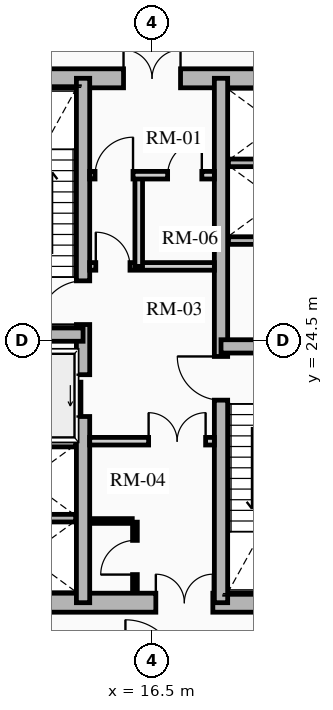
"""IFC4 building model, lengths in metres.
Left out: names, types, materials, properties, quantities, classifications, styles, units other than length and angle.
Written with IfcOpenShell. Run it as: python <this file> out.ifc"""

import sys

from ifc_helpers import new_model, si_unit, direction, frame, frame_2d, origin, place, context, subcontext, project, spatial, rectangle, extrude, source, transform, mapped, element, fill, save


model = new_model("IFC4")
c1 = context("Model", 3, precision=1e-05, world=origin(), true_north=direction((0.0, 1.0)))
c2 = subcontext(c1, "Body", "Model", "MODEL_VIEW")
j1 = project(units=[si_unit("LENGTHUNIT", "METRE"), si_unit("PLANEANGLEUNIT", "RADIAN")], contexts=[c1])
p1 = place(None, origin())
s1 = spatial("IfcSite", under=j1, at=p1, CompositionType="ELEMENT")
p2 = place(p1, origin())
s2 = spatial("IfcBuilding", under=s1, at=p2, CompositionType="ELEMENT")
p3 = place(p2, frame((0.0, 0.0, 65.65)))
s3 = spatial("IfcBuildingStorey", under=s2, at=p3, CompositionType="ELEMENT", Elevation=65.65)
p4 = place(p3, frame((11.15, 17.6, 0.0), z_axis=(0.0, 0.0, 1.0), x_axis=(1.0, 0.0, 0.0)))
e1 = element("IfcWall", 1, at=p4, inside=s3, PredefinedType="SHEAR", context=c2, shape_type="SweptSolid", body=[
    extrude(rectangle(XDim=10.7, YDim=0.5, at=frame_2d((5.35, 0.0))), origin(), (0.0, 0.0, 1.0), 4.5),
])
m1 = source(origin(), c2, "Body", "SweptSolid", [
    extrude(rectangle(XDim=1.5, YDim=2.02, at=frame_2d((0.75, 1.01))), frame((0.0, 0.26, 0.0), z_axis=(0.0, -1.0, 0.0), x_axis=(1.0, 0.0, 0.0)), (0.0, 0.0, 1.0), 0.52),
])
p5 = place(p4, frame((5.45, 0.0, 0.0)))
e2 = element("IfcOpeningElement", 2, at=p5, cuts=e1, PredefinedType="OPENING", context=c2, shape_type="MappedRepresentation", body=[
    mapped(m1, transform((0.0, 0.0, 0.0), x_axis=(1.0, 0.0, 0.0), y_axis=(0.0, 1.0, 0.0), z_axis=(0.0, 0.0, 1.0), scale=1.0)),
])
p6 = place(p3, frame((11.15, 31.4, 0.0), z_axis=(0.0, 0.0, 1.0), x_axis=(1.0, 0.0, 0.0)))
e3 = element("IfcWall", 3, at=p6, inside=s3, PredefinedType="SHEAR", context=c2, shape_type="SweptSolid", body=[
    extrude(rectangle(XDim=10.7, YDim=0.5, at=frame_2d((5.35, 0.0))), origin(), (0.0, 0.0, 1.0), 4.5),
])
p7 = place(p6, frame((4.6, 0.0, 0.0)))
e4 = element("IfcOpeningElement", 4, at=p7, cuts=e3, PredefinedType="OPENING", context=c2, shape_type="MappedRepresentation", body=[
    mapped(m1, transform((0.0, 0.0, 0.0), x_axis=(1.0, 0.0, 0.0), y_axis=(0.0, 1.0, 0.0), z_axis=(0.0, 0.0, 1.0), scale=1.0)),
])
p8 = place(p3, frame((14.685, 17.6, 0.0), z_axis=(0.0, 0.0, 1.0), x_axis=(0.0, 1.0, 0.0)))
e5 = element("IfcWall", 5, at=p8, inside=s3, PredefinedType="SHEAR", context=c2, shape_type="SweptSolid", body=[
    extrude(rectangle(XDim=13.8, YDim=0.35, at=frame_2d((6.9, 0.0))), origin(), (0.0, 0.0, 1.0), 4.5),
])
m2 = source(origin(), c2, "Body", "SweptSolid", [
    extrude(rectangle(XDim=1.1, YDim=2.015, at=frame_2d((0.55, 1.007))), frame((0.0, 0.185, 0.0), z_axis=(0.0, -1.0, 0.0), x_axis=(1.0, 0.0, 0.0)), (0.0, 0.0, 1.0), 0.37),
])
p9 = place(p8, frame((4.9, 0.0, 0.0)))
e6 = element("IfcOpeningElement", 6, at=p9, cuts=e5, PredefinedType="OPENING", context=c2, shape_type="MappedRepresentation", body=[
    mapped(m2, transform((0.0, 0.0, 0.0), x_axis=(1.0, 0.0, 0.0), y_axis=(0.0, 1.0, 0.0), z_axis=(0.0, 0.0, 1.0), scale=1.0)),
])
m3 = source(origin(), c2, "Body", "SweptSolid", [
    extrude(rectangle(XDim=1.15, YDim=2.02, at=frame_2d((0.575, 1.01))), frame((0.0, 0.185, 0.0), z_axis=(0.0, -1.0, 0.0), x_axis=(1.0, 0.0, 0.0)), (0.0, 0.0, 1.0), 0.37),
])
p10 = place(p8, frame((7.32, 0.0, 0.0)))
e7 = element("IfcOpeningElement", 7, at=p10, cuts=e5, PredefinedType="OPENING", context=c2, shape_type="MappedRepresentation", body=[
    mapped(m3, transform((0.0, 0.0, 0.0), x_axis=(1.0, 0.0, 0.0), y_axis=(0.0, 1.0, 0.0), z_axis=(0.0, 0.0, 1.0), scale=1.0)),
])
p11 = place(p3, frame((18.315, 17.6, 0.0), z_axis=(0.0, 0.0, 1.0), x_axis=(0.0, 1.0, 0.0)))
e8 = element("IfcWall", 8, at=p11, inside=s3, PredefinedType="SHEAR", context=c2, shape_type="SweptSolid", body=[
    extrude(rectangle(XDim=13.8, YDim=0.35, at=frame_2d((6.9, 0.0))), origin(), (0.0, 0.0, 1.0), 4.5),
])
p12 = place(p11, frame((5.33, 0.0, 0.0)))
e9 = element("IfcOpeningElement", 9, at=p12, cuts=e8, PredefinedType="OPENING", context=c2, shape_type="MappedRepresentation", body=[
    mapped(m3, transform((0.0, 0.0, 0.0), x_axis=(1.0, 0.0, 0.0), y_axis=(0.0, 1.0, 0.0), z_axis=(0.0, 0.0, 1.0), scale=1.0)),
])
for number, where, z_axis, x_axis in (
    (10, (11.4, 24.655, 0.0), (0.0, 0.0, 1.0), (1.0, 0.0, 0.0)),
    (11, (18.315, 24.345, 0.0), (0.0, 0.0, 1.0), (1.0, 0.0, 0.0)),
):
    element("IfcWall", number, at=place(p3, frame(where, z_axis=z_axis, x_axis=x_axis)), inside=s3, PredefinedType="SHEAR", context=c2, shape_type="SweptSolid", body=[
        extrude(rectangle(XDim=3.285, YDim=0.35, at=frame_2d((1.643, 0.0))), origin(), (0.0, 0.0, 1.0), 4.5),
    ])
for number, where, z_axis, x_axis in (
    (12, (11.52, 21.8, 0.0), (0.0, 0.0, 1.0), (1.0, 0.0, 0.0)),
    (13, (11.52, 19.825, 0.0), (0.0, 0.0, 1.0), (1.0, 0.0, 0.0)),
    (14, (18.51, 27.13, 0.0), (0.0, 0.0, 1.0), (1.0, 0.0, 0.0)),
    (15, (18.51, 29.175, 0.0), (0.0, 0.0, 1.0), (1.0, 0.0, 0.0)),
):
    element("IfcWall", number, at=place(p3, frame(where, z_axis=z_axis, x_axis=x_axis)), inside=s3, PredefinedType="SHEAR", context=c2, shape_type="SweptSolid", body=[
        extrude(rectangle(XDim=2.97, YDim=0.2, at=frame_2d((1.485, 0.0))), origin(), (0.0, 0.0, 1.0), 4.5),
    ])
p13 = place(p3, frame((14.86, 21.85, 0.0), z_axis=(0.0, 0.0, 1.0), x_axis=(1.0, 0.0, 0.0)))
e16 = element("IfcWall", 16, at=p13, inside=s3, PredefinedType="PARTITIONING", context=c2, shape_type="SweptSolid", body=[
    extrude(rectangle(XDim=3.28, YDim=0.2, at=frame_2d((1.64, 0.0))), origin(), (0.0, 0.0, 1.0), 4.245),
])
m4 = source(origin(), c2, "Body", "SweptSolid", [
    extrude(rectangle(XDim=1.5, YDim=2.02, at=frame_2d((0.75, 1.01))), frame((0.0, 0.11, 0.0), z_axis=(0.0, -1.0, 0.0), x_axis=(1.0, 0.0, 0.0)), (0.0, 0.0, 1.0), 0.22),
])
p14 = place(p13, frame((1.55, 0.0, 0.0)))
e17 = element("IfcOpeningElement", 17, at=p14, cuts=e16, PredefinedType="OPENING", context=c2, shape_type="MappedRepresentation", body=[
    mapped(m4, transform((0.0, 0.0, 0.0), x_axis=(1.0, 0.0, 0.0), y_axis=(0.0, 1.0, 0.0), z_axis=(0.0, 0.0, 1.0), scale=1.0)),
])
p15 = place(p3, frame((14.86, 26.45, 0.0), z_axis=(0.0, 0.0, 1.0), x_axis=(1.0, 0.0, 0.0)))
e18 = element("IfcWall", 18, at=p15, inside=s3, PredefinedType="PARTITIONING", context=c2, shape_type="SweptSolid", body=[
    extrude(rectangle(XDim=3.28, YDim=0.2, at=frame_2d((1.64, 0.0))), origin(), (0.0, 0.0, 1.0), 4.245),
])
m5 = source(origin(), c2, "Body", "SweptSolid", [
    extrude(rectangle(XDim=0.9, YDim=2.005, at=frame_2d((0.45, 1.002))), frame((0.0, 0.11, 0.0), z_axis=(0.0, -1.0, 0.0), x_axis=(1.0, 0.0, 0.0)), (0.0, 0.0, 1.0), 0.22),
])
p16 = place(p15, frame((0.16, 0.0, 0.0)))
e19 = element("IfcOpeningElement", 19, at=p16, cuts=e18, PredefinedType="OPENING", context=c2, shape_type="MappedRepresentation", body=[
    mapped(m5, transform((0.0, 0.0, 0.0), x_axis=(1.0, 0.0, 0.0), y_axis=(0.0, 1.0, 0.0), z_axis=(0.0, 0.0, 1.0), scale=1.0)),
])
p17 = place(p3, frame((16.15, 26.45, 0.0), z_axis=(0.0, 0.0, 1.0), x_axis=(0.0, 1.0, 0.0)))
e20 = element("IfcWall", 20, at=p17, inside=s3, PredefinedType="PARTITIONING", context=c2, shape_type="SweptSolid", body=[
    extrude(rectangle(XDim=2.4, YDim=0.2, at=frame_2d((1.2, 0.0))), origin(), (0.0, 0.0, 1.0), 4.245),
])
p18 = place(p3, frame((14.86, 28.85, 0.0), z_axis=(0.0, 0.0, 1.0), x_axis=(1.0, 0.0, 0.0)))
e21 = element("IfcWall", 21, at=p18, inside=s3, PredefinedType="PARTITIONING", context=c2, shape_type="SweptSolid", body=[
    extrude(rectangle(XDim=3.28, YDim=0.2, at=frame_2d((1.64, 0.0))), origin(), (0.0, 0.0, 1.0), 4.245),
])
m6 = source(origin(), c2, "Body", "SweptSolid", [
    extrude(rectangle(XDim=1.0, YDim=2.015, at=frame_2d((0.5, 1.007))), frame((0.0, 0.11, 0.0), z_axis=(0.0, -1.0, 0.0), x_axis=(1.0, 0.0, 0.0)), (0.0, 0.0, 1.0), 0.22),
])
p19 = place(p18, frame((0.14, 0.0, 0.0)))
e22 = element("IfcOpeningElement", 22, at=p19, cuts=e21, PredefinedType="OPENING", context=c2, shape_type="MappedRepresentation", body=[
    mapped(m6, transform((0.0, 0.0, 0.0), x_axis=(1.0, 0.0, 0.0), y_axis=(0.0, 1.0, 0.0), z_axis=(0.0, 0.0, 1.0), scale=1.0)),
])
p20 = place(p18, frame((2.05, 0.0, 0.0)))
e23 = element("IfcOpeningElement", 23, at=p20, cuts=e21, PredefinedType="OPENING", context=c2, shape_type="MappedRepresentation", body=[
    mapped(m5, transform((0.0, 0.0, 0.0), x_axis=(1.0, 0.0, 0.0), y_axis=(0.0, 1.0, 0.0), z_axis=(0.0, 0.0, 1.0), scale=1.0)),
])
p21 = place(p3, frame((16.05, 17.92, 0.0), z_axis=(0.0, 0.0, 1.0), x_axis=(0.0, 1.0, 0.0)))
e24 = element("IfcWall", 24, at=p21, inside=s3, PredefinedType="PARTITIONING", context=c2, shape_type="SweptSolid", body=[
    extrude(rectangle(XDim=1.8, YDim=0.125, at=frame_2d((0.9, 0.0))), origin(), (0.0, 0.0, 1.0), 4.245),
])
m7 = source(origin(), c2, "Body", "SweptSolid", [
    extrude(rectangle(XDim=0.9, YDim=2.005, at=frame_2d((0.45, 1.002))), frame((0.0, 0.073, 0.0), z_axis=(0.0, -1.0, 0.0), x_axis=(1.0, 0.0, 0.0)), (0.0, 0.0, 1.0), 0.145),
])
p22 = place(p21, frame((0.42, 0.0, 0.0)))
e25 = element("IfcOpeningElement", 25, at=p22, cuts=e24, PredefinedType="OPENING", context=c2, shape_type="MappedRepresentation", body=[
    mapped(m7, transform((0.0, 0.0, 0.0), x_axis=(1.0, 0.0, 0.0), y_axis=(0.0, 1.0, 0.0), z_axis=(0.0, 0.0, 1.0), scale=1.0)),
])
p23 = place(p3, frame((14.88, 19.75, 0.0), z_axis=(0.0, 0.0, 1.0), x_axis=(1.0, 0.0, 0.0)))
e26 = element("IfcWall", 26, at=p23, inside=s3, PredefinedType="PARTITIONING", context=c2, shape_type="SweptSolid", body=[
    extrude(rectangle(XDim=1.1, YDim=0.125, at=frame_2d((0.55, 0.0))), origin(), (0.0, 0.0, 1.0), 4.245),
])
m8 = source(origin(), c2, "Body", "SweptSolid", [
    extrude(rectangle(XDim=1.1, YDim=2.015, at=frame_2d((0.55, 1.007))), frame((0.0, 0.025, 0.0), z_axis=(0.0, -1.0, 0.0), x_axis=(1.0, 0.0, 0.0)), (0.0, 0.0, 1.0), 0.05),
])
p24 = place(p9, origin())
e27 = element("IfcDoor", 27, at=p24, inside=s3, OperationType="SLIDING_TO_LEFT", PredefinedType="DOOR", context=c2, shape_type="MappedRepresentation", body=[
    mapped(m8, transform((0.0, 0.0, 0.0), x_axis=(1.0, 0.0, 0.0), y_axis=(0.0, 1.0, 0.0), z_axis=(0.0, 0.0, 1.0), scale=1.0)),
])
fill(e6, e27)
m9 = source(origin(), c2, "Body", "SweptSolid", [
    extrude(rectangle(XDim=1.15, YDim=2.02, at=frame_2d((0.575, 1.01))), frame((0.0, 0.025, 0.0), z_axis=(0.0, -1.0, 0.0), x_axis=(1.0, 0.0, 0.0)), (0.0, 0.0, 1.0), 0.05),
])
p25 = place(p10, origin())
e28 = element("IfcDoor", 28, at=p25, inside=s3, OperationType="SINGLE_SWING_LEFT", PredefinedType="DOOR", context=c2, shape_type="MappedRepresentation", body=[
    mapped(m9, transform((0.0, 0.0, 0.0), x_axis=(1.0, 0.0, 0.0), y_axis=(0.0, 1.0, 0.0), z_axis=(0.0, 0.0, 1.0), scale=1.0)),
])
fill(e7, e28)
p26 = place(p12, origin())
e29 = element("IfcDoor", 29, at=p26, inside=s3, OperationType="SINGLE_SWING_RIGHT", PredefinedType="DOOR", context=c2, shape_type="MappedRepresentation", body=[
    mapped(m9, transform((0.0, 0.0, 0.0), x_axis=(1.0, 0.0, 0.0), y_axis=(0.0, 1.0, 0.0), z_axis=(0.0, 0.0, 1.0), scale=1.0)),
])
fill(e9, e29)
m10 = source(origin(), c2, "Body", "SweptSolid", [
    extrude(rectangle(XDim=1.5, YDim=2.02, at=frame_2d((0.75, 1.01))), frame((0.0, 0.025, 0.0), z_axis=(0.0, -1.0, 0.0), x_axis=(1.0, 0.0, 0.0)), (0.0, 0.0, 1.0), 0.05),
])
p27 = place(p7, origin())
e30 = element("IfcDoor", 30, at=p27, inside=s3, OperationType="DOUBLE_DOOR_SINGLE_SWING", PredefinedType="DOOR", context=c2, shape_type="MappedRepresentation", body=[
    mapped(m10, transform((0.0, 0.0, 0.0), x_axis=(1.0, 0.0, 0.0), y_axis=(0.0, 1.0, 0.0), z_axis=(0.0, 0.0, 1.0), scale=1.0)),
])
fill(e4, e30)
p28 = place(p5, origin())
e31 = element("IfcDoor", 31, at=p28, inside=s3, OperationType="DOUBLE_DOOR_SINGLE_SWING", PredefinedType="DOOR", context=c2, shape_type="MappedRepresentation", body=[
    mapped(m10, transform((0.0, 0.0, 0.0), x_axis=(1.0, 0.0, 0.0), y_axis=(0.0, 1.0, 0.0), z_axis=(0.0, 0.0, 1.0), scale=1.0)),
])
fill(e2, e31)
p29 = place(p14, origin())
e32 = element("IfcDoor", 32, at=p29, inside=s3, OperationType="DOUBLE_DOOR_SINGLE_SWING", PredefinedType="DOOR", context=c2, shape_type="MappedRepresentation", body=[
    mapped(m10, transform((0.0, 0.0, 0.0), x_axis=(1.0, 0.0, 0.0), y_axis=(0.0, 1.0, 0.0), z_axis=(0.0, 0.0, 1.0), scale=1.0)),
])
fill(e17, e32)
m11 = source(origin(), c2, "Body", "SweptSolid", [
    extrude(rectangle(XDim=0.9, YDim=2.005, at=frame_2d((0.45, 1.002))), frame((0.0, 0.025, 0.0), z_axis=(0.0, -1.0, 0.0), x_axis=(1.0, 0.0, 0.0)), (0.0, 0.0, 1.0), 0.05),
])
p30 = place(p16, origin())
e33 = element("IfcDoor", 33, at=p30, inside=s3, OperationType="SINGLE_SWING_LEFT", PredefinedType="DOOR", context=c2, shape_type="MappedRepresentation", body=[
    mapped(m11, transform((0.0, 0.0, 0.0), x_axis=(1.0, 0.0, 0.0), y_axis=(0.0, 1.0, 0.0), z_axis=(0.0, 0.0, 1.0), scale=1.0)),
])
fill(e19, e33)
m12 = source(origin(), c2, "Body", "SweptSolid", [
    extrude(rectangle(XDim=1.0, YDim=2.015, at=frame_2d((0.5, 1.007))), frame((0.0, 0.025, 0.0), z_axis=(0.0, -1.0, 0.0), x_axis=(1.0, 0.0, 0.0)), (0.0, 0.0, 1.0), 0.05),
])
p31 = place(p19, origin())
e34 = element("IfcDoor", 34, at=p31, inside=s3, OperationType="SINGLE_SWING_RIGHT", PredefinedType="DOOR", context=c2, shape_type="MappedRepresentation", body=[
    mapped(m12, transform((0.0, 0.0, 0.0), x_axis=(1.0, 0.0, 0.0), y_axis=(0.0, 1.0, 0.0), z_axis=(0.0, 0.0, 1.0), scale=1.0)),
])
fill(e22, e34)
p32 = place(p22, origin())
e35 = element("IfcDoor", 35, at=p32, inside=s3, OperationType="SINGLE_SWING_LEFT", PredefinedType="DOOR", context=c2, shape_type="MappedRepresentation", body=[
    mapped(m11, transform((0.0, 0.0, 0.0), x_axis=(1.0, 0.0, 0.0), y_axis=(0.0, 1.0, 0.0), z_axis=(0.0, 0.0, 1.0), scale=1.0)),
])
fill(e25, e35)
p33 = place(p20, origin())
e36 = element("IfcDoor", 36, at=p33, inside=s3, OperationType="SINGLE_SWING_RIGHT", PredefinedType="DOOR", context=c2, shape_type="MappedRepresentation", body=[
    mapped(m11, transform((0.0, 0.0, 0.0), x_axis=(1.0, 0.0, 0.0), y_axis=(0.0, 1.0, 0.0), z_axis=(0.0, 0.0, 1.0), scale=1.0)),
])
fill(e23, e36)
save(model, sys.argv[1])
